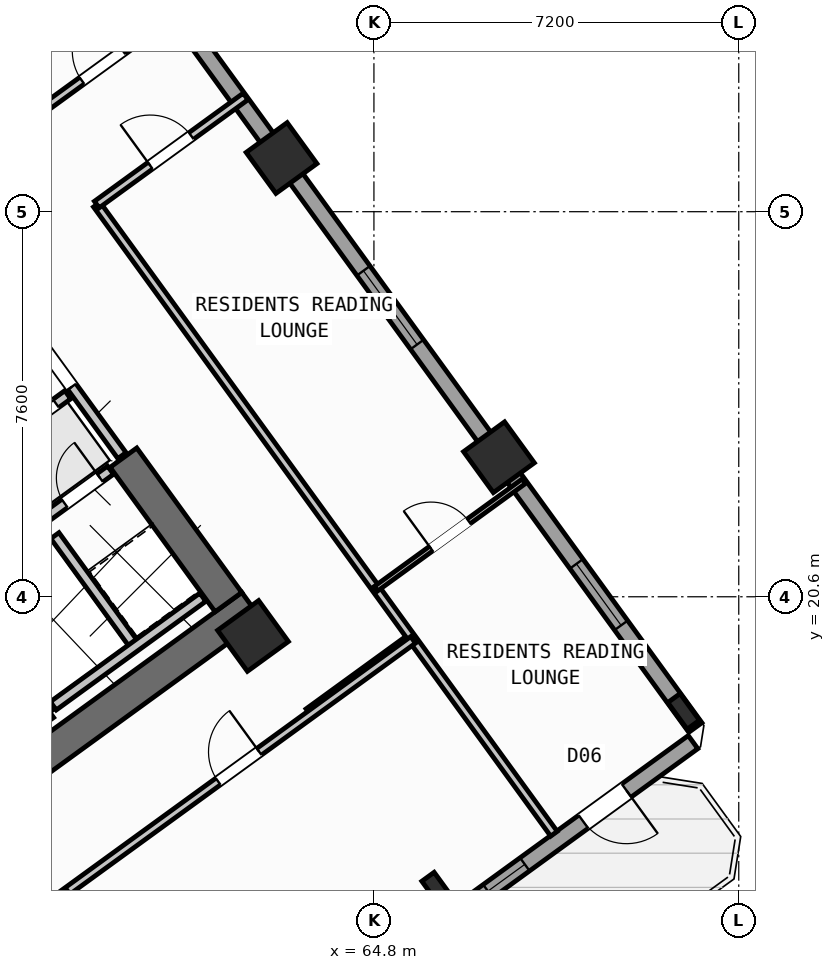
"""IFC4 building model, lengths in metres.
Left out: names, types, materials, properties, quantities, classifications, styles, units other than length and angle.
Written with IfcOpenShell. Run it as: python <this file> out.ifc"""

import sys

from ifc_helpers import new_model, si_unit, direction, frame, frame_2d, origin, origin_2d, place, context, subcontext, project, spatial, rectangle, hollow_rectangle, i_section, extrude, source, transform, mapped, element, fill, save


model = new_model("IFC4")
c1 = context("Model", 3, precision=1e-05, world=origin(), true_north=direction((0.0, 1.0)))
c2 = subcontext(c1, "Body", "Model", "MODEL_VIEW")
j1 = project(units=[si_unit("LENGTHUNIT", "METRE"), si_unit("PLANEANGLEUNIT", "RADIAN")], contexts=[c1])
p1 = place(None, origin())
s1 = spatial("IfcSite", under=j1, at=p1, CompositionType="ELEMENT")
p2 = place(p1, origin())
s2 = spatial("IfcBuilding", under=s1, at=p2, CompositionType="ELEMENT")
p3 = place(p2, frame((0.0, 0.0, 38.4)))
s3 = spatial("IfcBuildingStorey", under=s2, at=p3, CompositionType="ELEMENT", Elevation=38.4)
p4 = place(p3, frame((52.318, 13.11, 0.0), z_axis=(0.0, 0.0, 1.0), x_axis=(0.809019445368, 0.587781878776, 0.0)))
e1 = element("IfcWall", 1, at=p4, inside=s3, PredefinedType="SHEAR", context=c2, shape_type="SweptSolid", body=[
    extrude(rectangle(XDim=12.44, YDim=0.65, at=frame_2d((6.22, 0.0))), origin(), (0.0, 0.0, 1.0), 3.35),
])
p5 = place(p3, frame((61.929, 20.494, 0.0), z_axis=(0.0, 0.0, 1.0), x_axis=(-0.58782982593, 0.808984607855, 0.0)))
e2 = element("IfcWall", 2, at=p5, inside=s3, PredefinedType="SHEAR", context=c2, shape_type="SweptSolid", body=[
    extrude(rectangle(XDim=3.525, YDim=0.65, at=frame_2d((1.762, 0.0))), origin(), (0.0, 0.0, 1.0), 3.35),
])
m1 = source(origin(), c2, "Body", "SweptSolid", [
    extrude(i_section(OverallWidth=0.3, OverallDepth=0.65, WebThickness=0.016, FlangeThickness=0.031, at=origin_2d()), origin(), (0.0, 0.0, 1.0), 3.6),
])
p6 = place(p3, frame((66.058, 14.811, 0.0), z_axis=(0.0, 0.0, 1.0), x_axis=(0.809016994375, 0.587785252292, 0.0)))
e3 = element("IfcColumn", 3, at=p6, inside=s3, PredefinedType="COLUMN", context=c2, shape_type="MappedRepresentation", body=[
    mapped(m1, transform((0.0, 0.0, 0.0), scale=1.0)),
])
m2 = source(origin(), c2, "Body", "SweptSolid", [
    extrude(hollow_rectangle(XDim=1.0, YDim=1.0, WallThickness=0.04, at=origin_2d()), origin(), (0.0, 0.0, 1.0), 3.6),
])
p7 = place(p3, frame((62.414, 19.827, 0.0), z_axis=(0.0, 0.0, 1.0), x_axis=(0.809016994375, 0.587785252292, 0.0)))
e4 = element("IfcColumn", 4, at=p7, inside=s3, PredefinedType="COLUMN", context=c2, shape_type="MappedRepresentation", body=[
    mapped(m2, transform((0.0, 0.0, 0.0), scale=1.0)),
])
p8 = place(p3, frame((70.912, 18.338, 0.0), z_axis=(0.0, 0.0, 1.0), x_axis=(0.809016994375, 0.587785252292, 0.0)))
e5 = element("IfcColumn", 5, at=p8, inside=s3, PredefinedType="COLUMN", context=c2, shape_type="MappedRepresentation", body=[
    mapped(m1, transform((0.0, 0.0, 0.0), scale=1.0)),
])
for number, where, z_axis, x_axis in (
    (6, (67.268, 23.354, 0.0), (0.0, 0.0, 1.0), (0.809, 0.588, 0.0)),
    (7, (62.977, 29.259, 0.0), (0.0, 0.0, 1.0), (0.809, 0.588, 0.0)),
):
    element("IfcColumn", number, at=place(p3, frame(where, z_axis=z_axis, x_axis=x_axis)), inside=s3, PredefinedType="COLUMN", context=c2, shape_type="MappedRepresentation", body=[
        mapped(m2, transform((0.0, 0.0, 0.0), scale=1.0)),
    ])
p9 = place(p3, frame((58.455, 35.484, 0.0), z_axis=(0.0, 0.0, 1.0), x_axis=(0.587783625747, -0.809018176127, 0.0)))
e8 = element("IfcWall", 8, at=p9, inside=s3, PredefinedType="STANDARD", context=c2, shape_type="SweptSolid", body=[
    extrude(rectangle(XDim=21.587, YDim=0.32, at=frame_2d((10.794, 0.0))), origin(), (0.0, 0.0, 1.0), 2.725),
])
p10 = place(p9, frame((1.529, 0.0, 0.85)))
e9 = element("IfcOpeningElement", 9, at=p10, cuts=e8, PredefinedType="OPENING", context=c2, shape_type="SweptSolid", body=[
    extrude(rectangle(XDim=1.8, YDim=1.5, at=frame_2d((0.9, 0.75))), frame((0.0, 0.17, 0.0), z_axis=(0.0, -1.0, 0.0), x_axis=(1.0, 0.0, 0.0)), (0.0, 0.0, 1.0), 0.34),
])
p11 = place(p9, frame((10.444, 0.0, 0.85)))
e10 = element("IfcOpeningElement", 10, at=p11, cuts=e8, PredefinedType="OPENING", context=c2, shape_type="SweptSolid", body=[
    extrude(rectangle(XDim=1.8, YDim=1.5, at=frame_2d((0.9, 0.75))), frame((0.0, 0.17, 0.0), z_axis=(0.0, -1.0, 0.0), x_axis=(1.0, 0.0, 0.0)), (0.0, 0.0, 1.0), 0.34),
])
p12 = place(p9, frame((17.595, 0.0, 0.85)))
e11 = element("IfcOpeningElement", 11, at=p12, cuts=e8, PredefinedType="OPENING", context=c2, shape_type="SweptSolid", body=[
    extrude(rectangle(XDim=1.5, YDim=1.5, at=frame_2d((0.75, 0.75))), frame((0.0, 0.17, 0.0), z_axis=(0.0, -1.0, 0.0), x_axis=(1.0, 0.0, 0.0)), (0.0, 0.0, 1.0), 0.34),
])
p13 = place(p3, frame((71.098, 17.731, 0.0), z_axis=(0.0, 0.0, 1.0), x_axis=(-0.809021120468, -0.587779573171, 0.0)))
e12 = element("IfcWall", 12, at=p13, inside=s3, PredefinedType="STANDARD", context=c2, shape_type="SweptSolid", body=[
    extrude(rectangle(XDim=17.588, YDim=0.32, at=frame_2d((8.794, 0.0))), origin(), (0.0, 0.0, 1.0), 3.35),
])
p14 = place(p13, frame((1.624, 0.0, 0.0)))
e13 = element("IfcOpeningElement", 13, at=p14, cuts=e12, PredefinedType="OPENING", context=c2, shape_type="SweptSolid", body=[
    extrude(rectangle(XDim=1.05, YDim=2.15, at=frame_2d((0.525, 1.075))), frame((0.0, 0.17, 0.0), z_axis=(0.0, -1.0, 0.0), x_axis=(1.0, 0.0, 0.0)), (0.0, 0.0, 1.0), 0.34),
])
p15 = place(p13, frame((4.104, 0.0, 1.0)))
e14 = element("IfcOpeningElement", 14, at=p15, cuts=e12, PredefinedType="OPENING", context=c2, shape_type="SweptSolid", body=[
    extrude(rectangle(XDim=0.9, YDim=1.25, at=frame_2d((0.45, 0.625))), frame((0.0, 0.17, 0.0), z_axis=(0.0, -1.0, 0.0), x_axis=(1.0, 0.0, 0.0)), (0.0, 0.0, 1.0), 0.34),
])
p16 = place(p13, frame((7.879, 0.0, 0.85)))
e15 = element("IfcOpeningElement", 15, at=p16, cuts=e12, PredefinedType="OPENING", context=c2, shape_type="SweptSolid", body=[
    extrude(rectangle(XDim=1.8, YDim=1.5, at=frame_2d((0.9, 0.75))), frame((0.0, 0.17, 0.0), z_axis=(0.0, -1.0, 0.0), x_axis=(1.0, 0.0, 0.0)), (0.0, 0.0, 1.0), 0.34),
])
p17 = place(p13, frame((13.529, 0.0, 0.85)))
e16 = element("IfcOpeningElement", 16, at=p17, cuts=e12, PredefinedType="OPENING", context=c2, shape_type="SweptSolid", body=[
    extrude(rectangle(XDim=1.5, YDim=1.5, at=frame_2d((0.75, 0.75))), frame((0.0, 0.17, 0.0), z_axis=(0.0, -1.0, 0.0), x_axis=(1.0, 0.0, 0.0)), (0.0, 0.0, 1.0), 0.34),
])
p18 = place(p3, frame((52.472, 14.013, 0.0), z_axis=(0.0, 0.0, 1.0), x_axis=(0.809028366311, 0.587769599847, 0.0)))
e17 = element("IfcWall", 17, at=p18, inside=s3, PredefinedType="SHEAR", context=c2, shape_type="SweptSolid", body=[
    extrude(rectangle(XDim=7.33, YDim=0.26, at=frame_2d((3.665, 0.0))), origin(), (0.0, 0.0, 1.0), 3.35),
])
p19 = place(p3, frame((58.41, 18.327, 0.0), z_axis=(0.0, 0.0, 1.0), x_axis=(-0.58776738483, 0.809029975545, 0.0)))
e18 = element("IfcWall", 18, at=p19, inside=s3, PredefinedType="SHEAR", context=c2, shape_type="SweptSolid", body=[
    extrude(rectangle(XDim=3.16, YDim=0.26, at=frame_2d((1.58, 0.0))), origin(), (0.0, 0.0, 1.0), 3.35),
])
p20 = place(p3, frame((56.553, 20.884, 0.0), z_axis=(0.0, 0.0, 1.0), x_axis=(0.809035789462, 0.587759382205, 0.0)))
e19 = element("IfcWall", 19, at=p20, inside=s3, PredefinedType="STANDARD", context=c2, shape_type="SweptSolid", body=[
    extrude(rectangle(XDim=3.768, YDim=0.2, at=frame_2d((1.884, 0.0))), origin(), (0.0, 0.0, 1.0), 3.34),
])
p21 = place(p20, frame((2.65, 0.0, 0.0)))
e20 = element("IfcOpeningElement", 20, at=p21, cuts=e19, PredefinedType="OPENING", context=c2, shape_type="SweptSolid", body=[
    extrude(rectangle(XDim=0.86, YDim=2.05, at=frame_2d((0.43, 1.025))), frame((0.0, 0.11, 0.0), z_axis=(0.0, -1.0, 0.0), x_axis=(1.0, 0.0, 0.0)), (0.0, 0.0, 1.0), 0.22),
])
p22 = place(p3, frame((54.421, 21.436, 0.0), z_axis=(0.0, 0.0, 1.0), x_axis=(0.809013710463, 0.587789772183, 0.0)))
e21 = element("IfcWall", 21, at=p22, inside=s3, PredefinedType="STANDARD", context=c2, shape_type="SweptSolid", body=[
    extrude(rectangle(XDim=5.36, YDim=0.2, at=frame_2d((2.68, 0.0))), origin(), (0.0, 0.0, 1.0), 3.34),
])
p23 = place(p22, frame((0.37, 0.0, 0.0)))
e22 = element("IfcOpeningElement", 22, at=p23, cuts=e21, PredefinedType="OPENING", context=c2, shape_type="SweptSolid", body=[
    extrude(rectangle(XDim=1.1, YDim=2.15, at=frame_2d((0.55, 1.075))), frame((0.0, 0.11, 0.0), z_axis=(0.0, -1.0, 0.0), x_axis=(1.0, 0.0, 0.0)), (0.0, 0.0, 1.0), 0.22),
])
p24 = place(p22, frame((2.17, 0.0, 0.0)))
e23 = element("IfcOpeningElement", 23, at=p24, cuts=e21, PredefinedType="OPENING", context=c2, shape_type="SweptSolid", body=[
    extrude(rectangle(XDim=1.1, YDim=2.15, at=frame_2d((0.55, 1.075))), frame((0.0, 0.11, 0.0), z_axis=(0.0, -1.0, 0.0), x_axis=(1.0, 0.0, 0.0)), (0.0, 0.0, 1.0), 0.22),
])
p25 = place(p22, frame((3.97, 0.0, 0.0)))
e24 = element("IfcOpeningElement", 24, at=p25, cuts=e21, PredefinedType="OPENING", context=c2, shape_type="SweptSolid", body=[
    extrude(rectangle(XDim=1.1, YDim=2.15, at=frame_2d((0.55, 1.075))), frame((0.0, 0.11, 0.0), z_axis=(0.0, -1.0, 0.0), x_axis=(1.0, 0.0, 0.0)), (0.0, 0.0, 1.0), 0.22),
])
p26 = place(p3, frame((60.067, 19.655, 0.0), z_axis=(0.0, 0.0, 1.0), x_axis=(-0.587800520745, 0.809005900975, 0.0)))
e25 = element("IfcWall", 25, at=p26, inside=s3, PredefinedType="STANDARD", context=c2, shape_type="SweptSolid", body=[
    extrude(rectangle(XDim=2.66, YDim=0.2, at=frame_2d((1.33, 0.0))), origin(), (0.0, 0.0, 1.0), 3.34),
])
p27 = place(p3, frame((58.472, 18.447, 0.0), z_axis=(0.0, 0.0, 1.0), x_axis=(0.809022487728, 0.587777691266, 0.0)))
e26 = element("IfcWall", 26, at=p27, inside=s3, PredefinedType="STANDARD", context=c2, shape_type="SweptSolid", body=[
    extrude(rectangle(XDim=3.648, YDim=0.2, at=frame_2d((1.824, 0.0))), origin(), (0.0, 0.0, 1.0), 3.34),
])
p28 = place(p3, frame((59.827, 23.386, 0.0), z_axis=(0.0, 0.0, 1.0), x_axis=(-0.587803840107, 0.809003489211, 0.0)))
e27 = element("IfcWall", 27, at=p28, inside=s3, PredefinedType="STANDARD", context=c2, shape_type="SweptSolid", body=[
    extrude(rectangle(XDim=2.96, YDim=0.2, at=frame_2d((1.48, 0.0))), origin(), (0.0, 0.0, 1.0), 3.34),
])
p29 = place(p28, frame((1.68, 0.0, 0.0)))
e28 = element("IfcOpeningElement", 28, at=p29, cuts=e27, PredefinedType="OPENING", context=c2, shape_type="SweptSolid", body=[
    extrude(rectangle(XDim=1.0, YDim=2.1, at=frame_2d((0.5, 1.05))), frame((0.0, 0.11, 0.0), z_axis=(0.0, -1.0, 0.0), x_axis=(1.0, 0.0, 0.0)), (0.0, 0.0, 1.0), 0.22),
])
p30 = place(p3, frame((63.507, 18.322, 0.0), z_axis=(0.0, 0.0, 1.0), x_axis=(0.809034604122, 0.587761013791, 0.0)))
e29 = element("IfcWall", 29, at=p30, inside=s3, PredefinedType="PARTITIONING", context=c2, shape_type="SweptSolid", body=[
    extrude(rectangle(XDim=2.51, YDim=0.16, at=frame_2d((1.255, 0.0))), origin(), (0.0, 0.0, 1.0), 3.34),
])
p31 = place(p3, frame((68.353, 15.922, 0.0), z_axis=(0.0, 0.0, 1.0), x_axis=(-0.587782002009, 0.809019355834, 0.0)))
e30 = element("IfcWall", 30, at=p31, inside=s3, PredefinedType="PARTITIONING", context=c2, shape_type="SweptSolid", body=[
    extrude(rectangle(XDim=15.35, YDim=0.16, at=frame_2d((7.675, 0.0))), origin(), (0.0, 0.0, 1.0), 3.34),
])
p32 = place(p3, frame((59.331, 28.341, 0.0), z_axis=(0.0, 0.0, 1.0), x_axis=(0.809003564202, 0.587803736896, 0.0)))
e31 = element("IfcWall", 31, at=p32, inside=s3, PredefinedType="PARTITIONING", context=c2, shape_type="SweptSolid", body=[
    extrude(rectangle(XDim=3.63, YDim=0.16, at=frame_2d((1.815, 0.0))), origin(), (0.0, 0.0, 1.0), 3.34),
])
p33 = place(p32, frame((1.305, 0.0, 0.0)))
e32 = element("IfcOpeningElement", 32, at=p33, cuts=e31, PredefinedType="OPENING", context=c2, shape_type="SweptSolid", body=[
    extrude(rectangle(XDim=1.0, YDim=2.1, at=frame_2d((0.5, 1.05))), frame((0.0, 0.09, 0.0), z_axis=(0.0, -1.0, 0.0), x_axis=(1.0, 0.0, 0.0)), (0.0, 0.0, 1.0), 0.18),
])
p34 = place(p3, frame((58.067, 30.08, 0.0), z_axis=(0.0, 0.0, 1.0), x_axis=(0.809012309495, 0.587791700422, 0.0)))
e33 = element("IfcWall", 33, at=p34, inside=s3, PredefinedType="PARTITIONING", context=c2, shape_type="SweptSolid", body=[
    extrude(rectangle(XDim=3.63, YDim=0.16, at=frame_2d((1.815, 0.0))), origin(), (0.0, 0.0, 1.0), 3.34),
])
p35 = place(p34, frame((1.2, 0.0, 0.0)))
e34 = element("IfcOpeningElement", 34, at=p35, cuts=e33, PredefinedType="OPENING", context=c2, shape_type="SweptSolid", body=[
    extrude(rectangle(XDim=1.0, YDim=2.1, at=frame_2d((0.5, 1.05))), frame((0.0, 0.09, 0.0), z_axis=(0.0, -1.0, 0.0), x_axis=(1.0, 0.0, 0.0)), (0.0, 0.0, 1.0), 0.18),
])
p36 = place(p3, frame((64.839, 20.759, 0.0), z_axis=(0.0, 0.0, 1.0), x_axis=(0.809013833588, 0.587789602718, 0.0)))
e35 = element("IfcWall", 35, at=p36, inside=s3, PredefinedType="PARTITIONING", context=c2, shape_type="SweptSolid", body=[
    extrude(rectangle(XDim=3.61, YDim=0.11, at=frame_2d((1.805, 0.0))), origin(), (0.0, 0.0, 1.0), 3.34),
])
p37 = place(p36, frame((1.345, 0.0, 0.0)))
e36 = element("IfcOpeningElement", 36, at=p37, cuts=e35, PredefinedType="OPENING", context=c2, shape_type="SweptSolid", body=[
    extrude(rectangle(XDim=0.92, YDim=2.08, at=frame_2d((0.46, 1.04))), frame((0.0, 0.065, 0.0), z_axis=(0.0, -1.0, 0.0), x_axis=(1.0, 0.0, 0.0)), (0.0, 0.0, 1.0), 0.13),
])
p38 = place(p3, frame((53.705, 11.126, 0.0), z_axis=(0.0, 0.0, 1.0), x_axis=(0.809014504436, 0.587788679384, 0.0)))
e37 = element("IfcWall", 37, at=p38, inside=s3, PredefinedType="PARTITIONING", context=c2, shape_type="SweptSolid", body=[
    extrude(rectangle(XDim=14.67, YDim=0.16, at=frame_2d((7.335, 0.0))), origin(), (0.0, 0.0, 1.0), 3.34),
])
p39 = place(p38, frame((3.215, 0.0, 0.0)))
e38 = element("IfcOpeningElement", 38, at=p39, cuts=e37, PredefinedType="OPENING", context=c2, shape_type="SweptSolid", body=[
    extrude(rectangle(XDim=1.0, YDim=2.1, at=frame_2d((0.5, 1.05))), frame((0.0, 0.09, 0.0), z_axis=(0.0, -1.0, 0.0), x_axis=(1.0, 0.0, 0.0)), (0.0, 0.0, 1.0), 0.18),
])
p40 = place(p38, frame((9.915, 0.0, 0.0)))
e39 = element("IfcOpeningElement", 39, at=p40, cuts=e37, PredefinedType="OPENING", context=c2, shape_type="SweptSolid", body=[
    extrude(rectangle(XDim=1.0, YDim=2.1, at=frame_2d((0.5, 1.05))), frame((0.0, 0.09, 0.0), z_axis=(0.0, -1.0, 0.0), x_axis=(1.0, 0.0, 0.0)), (0.0, 0.0, 1.0), 0.18),
])
m3 = source(origin(), c2, "Body", "SweptSolid", [
    extrude(rectangle(XDim=1.05, YDim=2.15, at=frame_2d((0.525, 1.075))), frame((0.0, 0.025, 0.0), z_axis=(0.0, -1.0, 0.0), x_axis=(1.0, 0.0, 0.0)), (0.0, 0.0, 1.0), 0.05),
])
p41 = place(p14, origin())
e40 = element("IfcDoor", 40, at=p41, inside=s3, OperationType="SINGLE_SWING_LEFT", PredefinedType="DOOR", context=c2, shape_type="MappedRepresentation", body=[
    mapped(m3, transform((0.0, 0.0, 0.0), scale=1.0)),
])
fill(e13, e40)
m4 = source(origin(), c2, "Body", "SweptSolid", [
    extrude(rectangle(XDim=1.8, YDim=1.5, at=frame_2d((0.9, 0.75))), frame((0.0, 0.03, 0.0), z_axis=(0.0, -1.0, 0.0), x_axis=(1.0, 0.0, 0.0)), (0.0, 0.0, 1.0), 0.06),
])
p42 = place(p11, origin())
e41 = element("IfcWindow", 41, at=p42, inside=s3, PartitioningType="SINGLE_PANEL", PredefinedType="WINDOW", context=c2, shape_type="MappedRepresentation", body=[
    mapped(m4, transform((0.0, 0.0, 0.0), scale=1.0)),
])
fill(e10, e41)
m5 = source(origin(), c2, "Body", "SweptSolid", [
    extrude(rectangle(XDim=1.5, YDim=1.5, at=frame_2d((0.75, 0.75))), frame((0.0, 0.03, 0.0), z_axis=(0.0, -1.0, 0.0), x_axis=(1.0, 0.0, 0.0)), (0.0, 0.0, 1.0), 0.06),
])
p43 = place(p12, origin())
e42 = element("IfcWindow", 42, at=p43, inside=s3, PartitioningType="SINGLE_PANEL", PredefinedType="WINDOW", context=c2, shape_type="MappedRepresentation", body=[
    mapped(m5, transform((0.0, 0.0, 0.0), scale=1.0)),
])
fill(e11, e42)
m6 = source(origin(), c2, "Body", "SweptSolid", [
    extrude(rectangle(XDim=0.9, YDim=1.25, at=frame_2d((0.45, 0.625))), frame((0.0, 0.03, 0.0), z_axis=(0.0, -1.0, 0.0), x_axis=(1.0, 0.0, 0.0)), (0.0, 0.0, 1.0), 0.06),
])
p44 = place(p15, origin())
e43 = element("IfcWindow", 43, at=p44, inside=s3, PartitioningType="SINGLE_PANEL", PredefinedType="WINDOW", context=c2, shape_type="MappedRepresentation", body=[
    mapped(m6, transform((0.0, 0.0, 0.0), scale=1.0)),
])
fill(e14, e43)
m7 = source(origin(), c2, "Body", "SweptSolid", [
    extrude(rectangle(XDim=1.1, YDim=2.15, at=frame_2d((0.55, 1.075))), frame((0.0, 0.025, 0.0), z_axis=(0.0, -1.0, 0.0), x_axis=(1.0, 0.0, 0.0)), (0.0, 0.0, 1.0), 0.05),
])
p45 = place(p25, origin())
e44 = element("IfcDoor", 44, at=p45, inside=s3, OperationType="DOUBLE_DOOR_SLIDING", PredefinedType="DOOR", context=c2, shape_type="MappedRepresentation", body=[
    mapped(m7, transform((0.0, 0.0, 0.0), scale=1.0)),
])
fill(e24, e44)
m8 = source(origin(), c2, "Body", "SweptSolid", [
    extrude(rectangle(XDim=0.86, YDim=2.05, at=frame_2d((0.43, 1.025))), frame((0.0, 0.025, 0.0), z_axis=(0.0, -1.0, 0.0), x_axis=(1.0, 0.0, 0.0)), (0.0, 0.0, 1.0), 0.05),
])
p46 = place(p21, origin())
e45 = element("IfcDoor", 45, at=p46, inside=s3, OperationType="SINGLE_SWING_RIGHT", PredefinedType="DOOR", context=c2, shape_type="MappedRepresentation", body=[
    mapped(m8, transform((0.0, 0.0, 0.0), scale=1.0)),
])
fill(e20, e45)
m9 = source(origin(), c2, "Body", "SweptSolid", [
    extrude(rectangle(XDim=1.0, YDim=2.1, at=frame_2d((0.5, 1.05))), frame((0.0, 0.025, 0.0), z_axis=(0.0, -1.0, 0.0), x_axis=(1.0, 0.0, 0.0)), (0.0, 0.0, 1.0), 0.05),
])
p47 = place(p29, origin())
e46 = element("IfcDoor", 46, at=p47, inside=s3, OperationType="SINGLE_SWING_LEFT", PredefinedType="DOOR", context=c2, shape_type="MappedRepresentation", body=[
    mapped(m9, transform((0.0, 0.0, 0.0), scale=1.0)),
])
fill(e28, e46)
p48 = place(p35, origin())
e47 = element("IfcDoor", 47, at=p48, inside=s3, OperationType="SINGLE_SWING_RIGHT", PredefinedType="DOOR", context=c2, shape_type="MappedRepresentation", body=[
    mapped(m9, transform((0.0, 0.0, 0.0), scale=1.0)),
])
fill(e34, e47)
p49 = place(p33, origin())
e48 = element("IfcDoor", 48, at=p49, inside=s3, OperationType="SINGLE_SWING_LEFT", PredefinedType="DOOR", context=c2, shape_type="MappedRepresentation", body=[
    mapped(m9, transform((0.0, 0.0, 0.0), scale=1.0)),
])
fill(e32, e48)
m10 = source(origin(), c2, "Body", "SweptSolid", [
    extrude(rectangle(XDim=0.92, YDim=2.08, at=frame_2d((0.46, 1.04))), frame((0.0, 0.025, 0.0), z_axis=(0.0, -1.0, 0.0), x_axis=(1.0, 0.0, 0.0)), (0.0, 0.0, 1.0), 0.05),
])
p50 = place(p37, origin())
e49 = element("IfcDoor", 49, at=p50, inside=s3, OperationType="SINGLE_SWING_LEFT", PredefinedType="DOOR", context=c2, shape_type="MappedRepresentation", body=[
    mapped(m10, transform((0.0, 0.0, 0.0), scale=1.0)),
])
fill(e36, e49)
p51 = place(p40, origin())
e50 = element("IfcDoor", 50, at=p51, inside=s3, OperationType="SINGLE_SWING_RIGHT", PredefinedType="DOOR", context=c2, shape_type="MappedRepresentation", body=[
    mapped(m9, transform((0.0, 0.0, 0.0), scale=1.0)),
])
fill(e39, e50)
save(model, sys.argv[1])
